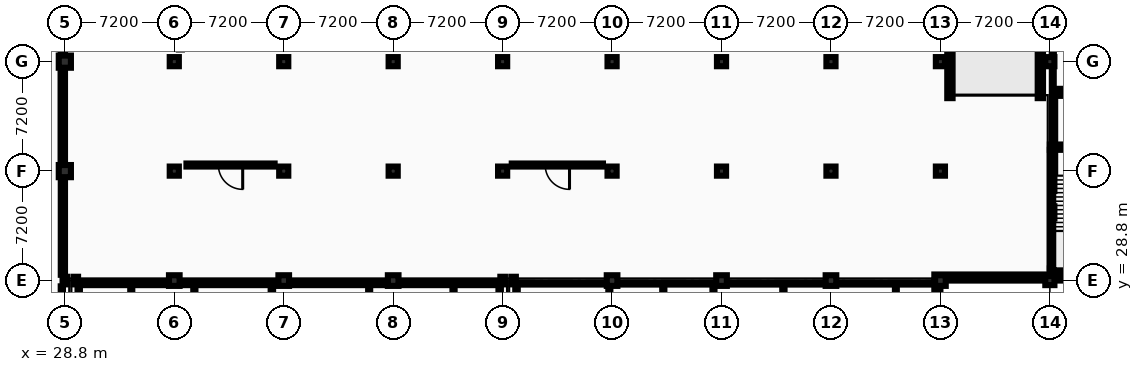
"""IFC4 building model, lengths in metres.
Left out: names, types, materials, properties, quantities, classifications, styles, units other than length and angle.
Written with IfcOpenShell. Run it as: python <this file> out.ifc"""

import sys

from ifc_helpers import new_model, si_unit, direction, frame, frame_2d, origin, origin_2d, place, context, subcontext, project, spatial, rectangle, i_section, extrude, element, fill, save


model = new_model("IFC4")
c1 = context("Model", 3, precision=1e-05, world=origin(), true_north=direction((0.0, 1.0)))
c2 = subcontext(c1, "Body", "Model", "MODEL_VIEW")
j1 = project(units=[si_unit("LENGTHUNIT", "METRE"), si_unit("PLANEANGLEUNIT", "RADIAN")], contexts=[c1])
p1 = place(None, origin())
s1 = spatial("IfcSite", under=j1, at=p1, CompositionType="ELEMENT")
p2 = place(p1, origin())
s2 = spatial("IfcBuilding", under=s1, at=p2, CompositionType="ELEMENT")
p3 = place(p2, frame((0.0, 0.0, -4.8)))
s3 = spatial("IfcBuildingStorey", under=s2, at=p3, CompositionType="ELEMENT", Elevation=-4.8)
p4 = place(p3, frame((28.8, 28.8, 0.0), z_axis=(0.0, 0.0, 1.0), x_axis=(1.0, 0.0, 0.0)))
e1 = element("IfcColumn", 1, at=p4, inside=s3, PredefinedType="COLUMN", context=c2, shape_type="SweptSolid", body=[
    extrude(i_section(OverallWidth=0.3, OverallDepth=0.5, WebThickness=0.014, FlangeThickness=0.028, FilletRadius=0.027, at=origin_2d()), origin(), (0.0, 0.0, 1.0), 4.8),
])
for number, where, z_axis, x_axis in (
    (2, (28.8, 36.0, 0.0), (0.0, 0.0, 1.0), (1.0, 0.0, 0.0)),
    (3, (28.8, 43.2, 0.0), (0.0, 0.0, 1.0), (1.0, 0.0, 0.0)),
):
    element("IfcColumn", number, at=place(p3, frame(where, z_axis=z_axis, x_axis=x_axis)), inside=s3, PredefinedType="COLUMN", context=c2, shape_type="SweptSolid", body=[
        extrude(rectangle(XDim=0.8, YDim=0.8, at=origin_2d()), origin(), (0.0, 0.0, 1.0), 4.8),
    ])
p5 = place(p3, frame((29.52, 28.8, 0.0), z_axis=(0.0, 0.0, 1.0), x_axis=(1.0, 0.0, 0.0)))
e4 = element("IfcColumn", 4, at=p5, inside=s3, PredefinedType="COLUMN", context=c2, shape_type="SweptSolid", body=[
    extrude(i_section(OverallWidth=0.3, OverallDepth=0.5, WebThickness=0.014, FlangeThickness=0.028, FilletRadius=0.027, at=origin_2d()), origin(), (0.0, 0.0, 1.0), 4.8),
])
p6 = place(p3, frame((36.0, 28.8, 0.0), z_axis=(0.0, 0.0, 1.0), x_axis=(1.0, 0.0, 0.0)))
e5 = element("IfcColumn", 5, at=p6, inside=s3, PredefinedType="COLUMN", context=c2, shape_type="SweptSolid", body=[
    extrude(rectangle(XDim=0.7, YDim=0.7, at=origin_2d()), origin(), (0.0, 0.0, 1.0), 4.8),
])
for number, where, z_axis, x_axis in (
    (6, (36.0, 36.0, 0.0), (0.0, 0.0, 1.0), (1.0, 0.0, 0.0)),
    (7, (36.0, 43.2, 0.0), (0.0, 0.0, 1.0), (1.0, 0.0, 0.0)),
):
    element("IfcColumn", number, at=place(p3, frame(where, z_axis=z_axis, x_axis=x_axis)), inside=s3, PredefinedType="COLUMN", context=c2, shape_type="SweptSolid", body=[
        extrude(rectangle(XDim=0.6, YDim=0.6, at=origin_2d()), origin(), (0.0, 0.0, 1.0), 4.8),
    ])
p7 = place(p3, frame((43.2, 28.8, 0.0), z_axis=(0.0, 0.0, 1.0), x_axis=(1.0, 0.0, 0.0)))
e8 = element("IfcColumn", 8, at=p7, inside=s3, PredefinedType="COLUMN", context=c2, shape_type="SweptSolid", body=[
    extrude(rectangle(XDim=0.7, YDim=0.7, at=origin_2d()), origin(), (0.0, 0.0, 1.0), 4.8),
])
for number, where, z_axis, x_axis in (
    (9, (43.2, 36.0, 0.0), (0.0, 0.0, 1.0), (1.0, 0.0, 0.0)),
    (10, (43.2, 43.2, 0.0), (0.0, 0.0, 1.0), (1.0, 0.0, 0.0)),
):
    element("IfcColumn", number, at=place(p3, frame(where, z_axis=z_axis, x_axis=x_axis)), inside=s3, PredefinedType="COLUMN", context=c2, shape_type="SweptSolid", body=[
        extrude(rectangle(XDim=0.6, YDim=0.6, at=origin_2d()), origin(), (0.0, 0.0, 1.0), 4.8),
    ])
p8 = place(p3, frame((50.4, 28.8, 0.0), z_axis=(0.0, 0.0, 1.0), x_axis=(1.0, 0.0, 0.0)))
e11 = element("IfcColumn", 11, at=p8, inside=s3, PredefinedType="COLUMN", context=c2, shape_type="SweptSolid", body=[
    extrude(rectangle(XDim=0.7, YDim=0.7, at=origin_2d()), origin(), (0.0, 0.0, 1.0), 4.8),
])
for number, where, z_axis, x_axis in (
    (12, (50.4, 36.0, 0.0), (0.0, 0.0, 1.0), (1.0, 0.0, 0.0)),
    (13, (50.4, 43.2, 0.0), (0.0, 0.0, 1.0), (1.0, 0.0, 0.0)),
):
    element("IfcColumn", number, at=place(p3, frame(where, z_axis=z_axis, x_axis=x_axis)), inside=s3, PredefinedType="COLUMN", context=c2, shape_type="SweptSolid", body=[
        extrude(rectangle(XDim=0.6, YDim=0.6, at=origin_2d()), origin(), (0.0, 0.0, 1.0), 4.8),
    ])
p9 = place(p3, frame((57.6, 28.8, 0.0), z_axis=(0.0, 0.0, 1.0), x_axis=(1.0, 0.0, 0.0)))
e14 = element("IfcColumn", 14, at=p9, inside=s3, PredefinedType="COLUMN", context=c2, shape_type="SweptSolid", body=[
    extrude(i_section(OverallWidth=0.3, OverallDepth=0.5, WebThickness=0.014, FlangeThickness=0.028, FilletRadius=0.027, at=origin_2d()), origin(), (0.0, 0.0, 1.0), 4.8),
])
for number, where, z_axis, x_axis in (
    (15, (57.6, 36.0, 0.0), (0.0, 0.0, 1.0), (1.0, 0.0, 0.0)),
    (16, (57.6, 43.2, 0.0), (0.0, 0.0, 1.0), (1.0, 0.0, 0.0)),
):
    element("IfcColumn", number, at=place(p3, frame(where, z_axis=z_axis, x_axis=x_axis)), inside=s3, PredefinedType="COLUMN", context=c2, shape_type="SweptSolid", body=[
        extrude(rectangle(XDim=0.6, YDim=0.6, at=origin_2d()), origin(), (0.0, 0.0, 1.0), 4.8),
    ])
p10 = place(p3, frame((58.32, 28.8, 0.0), z_axis=(0.0, 0.0, 1.0), x_axis=(1.0, 0.0, 0.0)))
e17 = element("IfcColumn", 17, at=p10, inside=s3, PredefinedType="COLUMN", context=c2, shape_type="SweptSolid", body=[
    extrude(i_section(OverallWidth=0.3, OverallDepth=0.5, WebThickness=0.014, FlangeThickness=0.028, FilletRadius=0.027, at=origin_2d()), origin(), (0.0, 0.0, 1.0), 4.8),
])
p11 = place(p3, frame((64.8, 28.8, 0.0), z_axis=(0.0, 0.0, 1.0), x_axis=(1.0, 0.0, 0.0)))
e18 = element("IfcColumn", 18, at=p11, inside=s3, PredefinedType="COLUMN", context=c2, shape_type="SweptSolid", body=[
    extrude(rectangle(XDim=0.7, YDim=0.7, at=origin_2d()), origin(), (0.0, 0.0, 1.0), 4.8),
])
for number, where, z_axis, x_axis in (
    (19, (64.8, 36.0, 0.0), (0.0, 0.0, 1.0), (1.0, 0.0, 0.0)),
    (20, (64.8, 43.2, 0.0), (0.0, 0.0, 1.0), (1.0, 0.0, 0.0)),
):
    element("IfcColumn", number, at=place(p3, frame(where, z_axis=z_axis, x_axis=x_axis)), inside=s3, PredefinedType="COLUMN", context=c2, shape_type="SweptSolid", body=[
        extrude(rectangle(XDim=0.6, YDim=0.6, at=origin_2d()), origin(), (0.0, 0.0, 1.0), 4.8),
    ])
p12 = place(p3, frame((72.0, 28.8, 0.0), z_axis=(0.0, 0.0, 1.0), x_axis=(1.0, 0.0, 0.0)))
e21 = element("IfcColumn", 21, at=p12, inside=s3, PredefinedType="COLUMN", context=c2, shape_type="SweptSolid", body=[
    extrude(rectangle(XDim=0.7, YDim=0.7, at=origin_2d()), origin(), (0.0, 0.0, 1.0), 4.8),
])
for number, where, z_axis, x_axis in (
    (22, (72.0, 36.0, 0.0), (0.0, 0.0, 1.0), (1.0, 0.0, 0.0)),
    (23, (72.0, 43.2, 0.0), (0.0, 0.0, 1.0), (1.0, 0.0, 0.0)),
):
    element("IfcColumn", number, at=place(p3, frame(where, z_axis=z_axis, x_axis=x_axis)), inside=s3, PredefinedType="COLUMN", context=c2, shape_type="SweptSolid", body=[
        extrude(rectangle(XDim=0.6, YDim=0.6, at=origin_2d()), origin(), (0.0, 0.0, 1.0), 4.8),
    ])
p13 = place(p3, frame((79.2, 28.8, 0.0), z_axis=(0.0, 0.0, 1.0), x_axis=(1.0, 0.0, 0.0)))
e24 = element("IfcColumn", 24, at=p13, inside=s3, PredefinedType="COLUMN", context=c2, shape_type="SweptSolid", body=[
    extrude(rectangle(XDim=0.7, YDim=0.7, at=origin_2d()), origin(), (0.0, 0.0, 1.0), 4.8),
])
for number, where, z_axis, x_axis in (
    (25, (79.2, 36.0, 0.0), (0.0, 0.0, 1.0), (1.0, 0.0, 0.0)),
    (26, (79.2, 43.2, 0.0), (0.0, 0.0, 1.0), (1.0, 0.0, 0.0)),
):
    element("IfcColumn", number, at=place(p3, frame(where, z_axis=z_axis, x_axis=x_axis)), inside=s3, PredefinedType="COLUMN", context=c2, shape_type="SweptSolid", body=[
        extrude(rectangle(XDim=0.6, YDim=0.6, at=origin_2d()), origin(), (0.0, 0.0, 1.0), 4.8),
    ])
p14 = place(p3, frame((86.4, 28.8, 0.0), z_axis=(0.0, 0.0, 1.0), x_axis=(1.0, 0.0, 0.0)))
e27 = element("IfcColumn", 27, at=p14, inside=s3, PredefinedType="COLUMN", context=c2, shape_type="SweptSolid", body=[
    extrude(rectangle(XDim=0.7, YDim=0.7, at=origin_2d()), origin(), (0.0, 0.0, 1.0), 4.8),
])
for number, where, z_axis, x_axis in (
    (28, (86.4, 36.0, 0.0), (0.0, 0.0, 1.0), (1.0, 0.0, 0.0)),
    (29, (86.4, 43.2, 0.0), (0.0, 0.0, 1.0), (1.0, 0.0, 0.0)),
    (30, (93.6, 28.8, 0.0), (0.0, 0.0, 1.0), (1.0, 0.0, 0.0)),
    (31, (93.6, 43.2, 0.0), (0.0, 0.0, 1.0), (1.0, 0.0, 0.0)),
):
    element("IfcColumn", number, at=place(p3, frame(where, z_axis=z_axis, x_axis=x_axis)), inside=s3, PredefinedType="COLUMN", context=c2, shape_type="SweptSolid", body=[
        extrude(rectangle(XDim=0.6, YDim=0.6, at=origin_2d()), origin(), (0.0, 0.0, 1.0), 4.8),
    ])
p15 = place(p3, frame((86.2, 0.4, 0.0), z_axis=(0.0, 0.0, 1.0), x_axis=(0.0, 1.0, 0.0)))
e32 = element("IfcWall", 32, at=p15, inside=s3, PredefinedType="USERDEFINED", context=c2, shape_type="SweptSolid", body=[
    extrude(rectangle(XDim=28.4, YDim=0.4, at=frame_2d((14.2, 0.0))), origin(), (0.0, 0.0, 1.0), 4.545),
])
p16 = place(p3, frame((86.0, 29.0, 0.0), z_axis=(0.0, 0.0, 1.0), x_axis=(1.0, 0.0, 0.0)))
e33 = element("IfcWall", 33, at=p16, inside=s3, PredefinedType="USERDEFINED", context=c2, shape_type="SweptSolid", body=[
    extrude(rectangle(XDim=36.4, YDim=0.4, at=frame_2d((18.2, 0.0))), origin(), (0.0, 0.0, 1.0), 4.545),
])
for number, where, z_axis, x_axis in (
    (34, (87.025, 40.8, 0.0), (0.0, 0.0, 1.0), (0.0, 1.0, 0.0)),
    (35, (92.975, 40.8, 0.0), (0.0, 0.0, 1.0), (0.0, 1.0, 0.0)),
):
    element("IfcWall", number, at=place(p3, frame(where, z_axis=z_axis, x_axis=x_axis)), inside=s3, PredefinedType="USERDEFINED", context=c2, shape_type="SweptSolid", body=[
        extrude(rectangle(XDim=11.2, YDim=0.35, at=frame_2d((5.6, 0.0))), origin(), (0.0, 0.0, 1.0), 4.58),
    ])
p17 = place(p3, frame((93.6, 29.425, 0.0), z_axis=(0.0, 0.0, 1.0), x_axis=(1.0, 0.0, 0.0)))
e36 = element("IfcWall", 36, at=p17, inside=s3, PredefinedType="SHEAR", context=c2, shape_type="SweptSolid", body=[
    extrude(rectangle(XDim=3.85, YDim=0.35, at=frame_2d((1.925, 0.0))), origin(), (0.0, 0.0, 1.0), 4.545),
])
p18 = place(p3, frame((93.6, 37.575, 0.0), z_axis=(0.0, 0.0, 1.0), x_axis=(1.0, 0.0, 0.0)))
e37 = element("IfcWall", 37, at=p18, inside=s3, PredefinedType="SHEAR", context=c2, shape_type="SweptSolid", body=[
    extrude(rectangle(XDim=3.85, YDim=0.35, at=frame_2d((1.925, 0.0))), origin(), (0.0, 0.0, 1.0), 4.545),
])
p19 = place(p18, frame((1.375, 0.0, 0.0)))
e38 = element("IfcOpeningElement", 38, at=p19, cuts=e37, PredefinedType="OPENING", context=c2, shape_type="SweptSolid", body=[
    extrude(rectangle(XDim=1.1, YDim=2.15, at=frame_2d((0.55, 1.075))), frame((0.0, 0.185, 0.0), z_axis=(0.0, -1.0, 0.0), x_axis=(1.0, 0.0, 0.0)), (0.0, 0.0, 1.0), 0.37),
])
p20 = place(p3, frame((93.775, 29.6, 0.0), z_axis=(0.0, 0.0, 1.0), x_axis=(0.0, 1.0, 0.0)))
e39 = element("IfcWall", 39, at=p20, inside=s3, PredefinedType="SHEAR", context=c2, shape_type="SweptSolid", body=[
    extrude(rectangle(XDim=7.8, YDim=0.35, at=frame_2d((3.9, 0.0))), origin(), (0.0, 0.0, 1.0), 4.545),
])
p21 = place(p3, frame((93.95, 41.05, 0.0), z_axis=(0.0, 0.0, 1.0), x_axis=(1.0, 0.0, 0.0)))
e40 = element("IfcWall", 40, at=p21, inside=s3, PredefinedType="PARTITIONING", context=c2, shape_type="SweptSolid", body=[
    extrude(rectangle(XDim=5.75, YDim=0.2, at=frame_2d((2.875, 0.0))), origin(), (0.0, 0.0, 1.0), 4.545),
])
p22 = place(p3, frame((93.85, 37.75, 0.0), z_axis=(0.0, 0.0, 1.0), x_axis=(0.0, 1.0, 0.0)))
e41 = element("IfcWall", 41, at=p22, inside=s3, PredefinedType="PARTITIONING", context=c2, shape_type="SweptSolid", body=[
    extrude(rectangle(XDim=3.4, YDim=0.2, at=frame_2d((1.7, 0.0))), origin(), (0.0, 0.0, 1.0), 4.545),
])
p23 = place(p3, frame((29.9, 28.6, 0.0), z_axis=(0.0, 0.0, 1.0), x_axis=(1.0, 0.0, 0.0)))
e42 = element("IfcWall", 42, at=p23, inside=s3, PredefinedType="PARTITIONING", context=c2, shape_type="SweptSolid", body=[
    extrude(rectangle(XDim=5.72, YDim=0.2, at=frame_2d((2.86, 0.0))), origin(), (0.0, 0.0, 1.0), 4.095),
])
p24 = place(p3, frame((36.38, 28.6, 0.0), z_axis=(0.0, 0.0, 1.0), x_axis=(1.0, 0.0, 0.0)))
e43 = element("IfcWall", 43, at=p24, inside=s3, PredefinedType="PARTITIONING", context=c2, shape_type="SweptSolid", body=[
    extrude(rectangle(XDim=6.44, YDim=0.2, at=frame_2d((3.22, 0.0))), origin(), (0.0, 0.0, 1.0), 4.095),
])
for number, where, z_axis, x_axis in (
    (44, (43.58, 28.6, 0.0), (0.0, 0.0, 1.0), (1.0, 0.0, 0.0)),
    (45, (50.78, 28.6, 0.0), (0.0, 0.0, 1.0), (1.0, 0.0, 0.0)),
):
    element("IfcWall", number, at=place(p3, frame(where, z_axis=z_axis, x_axis=x_axis)), inside=s3, PredefinedType="PARTITIONING", context=c2, shape_type="SweptSolid", body=[
        extrude(rectangle(XDim=6.44, YDim=0.2, at=frame_2d((3.22, 0.0))), origin(), (0.0, 0.0, 1.0), 4.095),
    ])
p25 = place(p3, frame((58.7, 28.6, 0.0), z_axis=(0.0, 0.0, 1.0), x_axis=(1.0, 0.0, 0.0)))
e46 = element("IfcWall", 46, at=p25, inside=s3, PredefinedType="PARTITIONING", context=c2, shape_type="SweptSolid", body=[
    extrude(rectangle(XDim=5.72, YDim=0.125, at=frame_2d((2.86, 0.0))), origin(), (0.0, 0.0, 1.0), 4.095),
])
for number, where, z_axis, x_axis in (
    (47, (65.18, 28.6, 0.0), (0.0, 0.0, 1.0), (1.0, 0.0, 0.0)),
    (48, (72.38, 28.6, 0.0), (0.0, 0.0, 1.0), (1.0, 0.0, 0.0)),
):
    element("IfcWall", number, at=place(p3, frame(where, z_axis=z_axis, x_axis=x_axis)), inside=s3, PredefinedType="PARTITIONING", context=c2, shape_type="SweptSolid", body=[
        extrude(rectangle(XDim=6.44, YDim=0.125, at=frame_2d((3.22, 0.0))), origin(), (0.0, 0.0, 1.0), 4.095),
    ])
p26 = place(p3, frame((79.58, 28.6, 0.0), z_axis=(0.0, 0.0, 1.0), x_axis=(1.0, 0.0, 0.0)))
e49 = element("IfcWall", 49, at=p26, inside=s3, PredefinedType="PARTITIONING", context=c2, shape_type="SweptSolid", body=[
    extrude(rectangle(XDim=6.4, YDim=0.125, at=frame_2d((3.2, 0.0))), origin(), (0.0, 0.0, 1.0), 4.095),
])
p27 = place(p3, frame((93.97, 41.35, 0.0), z_axis=(0.0, 0.0, 1.0), x_axis=(1.0, 0.0, 0.0)))
e50 = element("IfcWall", 50, at=p27, inside=s3, PredefinedType="PARTITIONING", context=c2, shape_type="SweptSolid", body=[
    extrude(rectangle(XDim=5.71, YDim=0.125, at=frame_2d((2.855, 0.0))), origin(), (0.0, 0.0, 1.0), 4.545),
])
p28 = place(p3, frame((28.6, 21.98, 0.0), z_axis=(0.0, 0.0, 1.0), x_axis=(0.0, 1.0, 0.0)))
e51 = element("IfcWall", 51, at=p28, inside=s3, PredefinedType="PARTITIONING", context=c2, shape_type="SweptSolid", body=[
    extrude(rectangle(XDim=6.44, YDim=0.142, at=frame_2d((3.22, 0.0))), origin(), (0.0, 0.0, 1.0), 4.245),
])
p29 = place(p3, frame((28.6, 29.18, 0.0), z_axis=(0.0, 0.0, 1.0), x_axis=(0.0, 1.0, 0.0)))
e52 = element("IfcWall", 52, at=p29, inside=s3, PredefinedType="PARTITIONING", context=c2, shape_type="SweptSolid", body=[
    extrude(rectangle(XDim=6.44, YDim=0.135, at=frame_2d((3.22, 0.0))), origin(), (0.0, 0.0, 1.0), 4.245),
])
p30 = place(p3, frame((28.6, 36.38, 0.0), z_axis=(0.0, 0.0, 1.0), x_axis=(0.0, 1.0, 0.0)))
e53 = element("IfcWall", 53, at=p30, inside=s3, PredefinedType="PARTITIONING", context=c2, shape_type="SweptSolid", body=[
    extrude(rectangle(XDim=6.44, YDim=0.16, at=frame_2d((3.22, 0.0))), origin(), (0.0, 0.0, 1.0), 4.245),
])
p31 = place(p3, frame((28.6, 43.58, 0.0), z_axis=(0.0, 0.0, 1.0), x_axis=(0.0, 1.0, 0.0)))
e54 = element("IfcWall", 54, at=p31, inside=s3, PredefinedType="PARTITIONING", context=c2, shape_type="SweptSolid", body=[
    extrude(rectangle(XDim=6.44, YDim=0.15, at=frame_2d((3.22, 0.0))), origin(), (0.0, 0.0, 1.0), 4.245),
])
p32 = place(p3, frame((29.72, 21.98, 0.0), z_axis=(0.0, 0.0, 1.0), x_axis=(0.0, 1.0, 0.0)))
e55 = element("IfcWall", 55, at=p32, inside=s3, PredefinedType="PARTITIONING", context=c2, shape_type="SweptSolid", body=[
    extrude(rectangle(XDim=6.44, YDim=0.142, at=frame_2d((3.22, 0.0))), origin(), (0.0, 0.0, 1.0), 4.245),
])
p33 = place(p3, frame((33.17, 14.45, 0.0), z_axis=(0.0, 0.0, 1.0), x_axis=(0.0, 1.0, 0.0)))
e56 = element("IfcWall", 56, at=p33, inside=s3, PredefinedType="PARTITIONING", context=c2, shape_type="SweptSolid", body=[
    extrude(rectangle(XDim=14.05, YDim=0.135, at=frame_2d((7.025, 0.0))), origin(), (0.0, 0.0, 1.0), 4.545),
])
p34 = place(p3, frame((37.32, 14.45, 0.0), z_axis=(0.0, 0.0, 1.0), x_axis=(0.0, 1.0, 0.0)))
e57 = element("IfcWall", 57, at=p34, inside=s3, PredefinedType="PARTITIONING", context=c2, shape_type="SweptSolid", body=[
    extrude(rectangle(XDim=14.05, YDim=0.142, at=frame_2d((7.025, 0.0))), origin(), (0.0, 0.0, 1.0), 4.545),
])
p35 = place(p3, frame((42.42, 14.45, 0.0), z_axis=(0.0, 0.0, 1.0), x_axis=(0.0, 1.0, 0.0)))
e58 = element("IfcWall", 58, at=p35, inside=s3, PredefinedType="PARTITIONING", context=c2, shape_type="SweptSolid", body=[
    extrude(rectangle(XDim=14.05, YDim=0.16, at=frame_2d((7.025, 0.0))), origin(), (0.0, 0.0, 1.0), 4.545),
])
p36 = place(p3, frame((48.82, 14.45, 0.0), z_axis=(0.0, 0.0, 1.0), x_axis=(0.0, 1.0, 0.0)))
e59 = element("IfcWall", 59, at=p36, inside=s3, PredefinedType="PARTITIONING", context=c2, shape_type="SweptSolid", body=[
    extrude(rectangle(XDim=14.05, YDim=0.135, at=frame_2d((7.025, 0.0))), origin(), (0.0, 0.0, 1.0), 4.545),
])
p37 = place(p3, frame((54.37, 14.45, 0.0), z_axis=(0.0, 0.0, 1.0), x_axis=(0.0, 1.0, 0.0)))
e60 = element("IfcWall", 60, at=p37, inside=s3, PredefinedType="PARTITIONING", context=c2, shape_type="SweptSolid", body=[
    extrude(rectangle(XDim=14.05, YDim=0.142, at=frame_2d((7.025, 0.0))), origin(), (0.0, 0.0, 1.0), 4.545),
])
for number, where, z_axis, x_axis in (
    (61, (57.4, 21.98, 0.0), (0.0, 0.0, 1.0), (0.0, 1.0, 0.0)),
    (62, (58.52, 21.98, 0.0), (0.0, 0.0, 1.0), (0.0, 1.0, 0.0)),
):
    element("IfcWall", number, at=place(p3, frame(where, z_axis=z_axis, x_axis=x_axis)), inside=s3, PredefinedType="PARTITIONING", context=c2, shape_type="SweptSolid", body=[
        extrude(rectangle(XDim=6.44, YDim=0.15, at=frame_2d((3.22, 0.0))), origin(), (0.0, 0.0, 1.0), 4.245),
    ])
p38 = place(p3, frame((64.62, 21.98, 0.0), z_axis=(0.0, 0.0, 1.0), x_axis=(0.0, 1.0, 0.0)))
e63 = element("IfcWall", 63, at=p38, inside=s3, PredefinedType="PARTITIONING", context=c2, shape_type="SweptSolid", body=[
    extrude(rectangle(XDim=6.44, YDim=0.135, at=frame_2d((3.22, 0.0))), origin(), (0.0, 0.0, 1.0), 4.245),
])
p39 = place(p3, frame((68.17, 14.413, 0.0), z_axis=(0.0, 0.0, 1.0), x_axis=(0.0, 1.0, 0.0)))
e64 = element("IfcWall", 64, at=p39, inside=s3, PredefinedType="PARTITIONING", context=c2, shape_type="SweptSolid", body=[
    extrude(rectangle(XDim=14.125, YDim=0.142, at=frame_2d((7.062, 0.0))), origin(), (0.0, 0.0, 1.0), 4.545),
])
p40 = place(p3, frame((71.47, 14.413, 0.0), z_axis=(0.0, 0.0, 1.0), x_axis=(0.0, 1.0, 0.0)))
e65 = element("IfcWall", 65, at=p40, inside=s3, PredefinedType="PARTITIONING", context=c2, shape_type="SweptSolid", body=[
    extrude(rectangle(XDim=14.125, YDim=0.135, at=frame_2d((7.062, 0.0))), origin(), (0.0, 0.0, 1.0), 4.545),
])
p41 = place(p3, frame((76.07, 14.413, 0.0), z_axis=(0.0, 0.0, 1.0), x_axis=(0.0, 1.0, 0.0)))
e66 = element("IfcWall", 66, at=p41, inside=s3, PredefinedType="PARTITIONING", context=c2, shape_type="SweptSolid", body=[
    extrude(rectangle(XDim=14.125, YDim=0.15, at=frame_2d((7.062, 0.0))), origin(), (0.0, 0.0, 1.0), 4.545),
])
p42 = place(p3, frame((83.47, 14.413, 0.0), z_axis=(0.0, 0.0, 1.0), x_axis=(0.0, 1.0, 0.0)))
e67 = element("IfcWall", 67, at=p42, inside=s3, PredefinedType="PARTITIONING", context=c2, shape_type="SweptSolid", body=[
    extrude(rectangle(XDim=14.125, YDim=0.125, at=frame_2d((7.062, 0.0))), origin(), (0.0, 0.0, 1.0), 4.545),
])
p43 = place(p3, frame((93.8, 41.35, 0.0), z_axis=(0.0, 0.0, 1.0), x_axis=(0.0, 1.0, 0.0)))
e68 = element("IfcWall", 68, at=p43, inside=s3, PredefinedType="PARTITIONING", context=c2, shape_type="SweptSolid", body=[
    extrude(rectangle(XDim=1.47, YDim=0.11, at=frame_2d((0.735, 0.0))), origin(), (0.0, 0.0, 1.0), 4.545),
])
p44 = place(p3, frame((93.8, 43.58, 0.0), z_axis=(0.0, 0.0, 1.0), x_axis=(0.0, 1.0, 0.0)))
e69 = element("IfcWall", 69, at=p44, inside=s3, PredefinedType="PARTITIONING", context=c2, shape_type="SweptSolid", body=[
    extrude(rectangle(XDim=1.37, YDim=0.125, at=frame_2d((0.685, 0.0))), origin(), (0.0, 0.0, 1.0), 4.545),
])
p45 = place(p3, frame((36.8, 36.4, 0.0), z_axis=(0.0, 0.0, 1.0), x_axis=(1.0, 0.0, 0.0)))
e70 = element("IfcWall", 70, at=p45, inside=s3, PredefinedType="PARTITIONING", context=c2, shape_type="SweptSolid", body=[
    extrude(rectangle(XDim=5.8, YDim=0.2, at=frame_2d((2.9, 0.0))), origin(), (0.0, 0.0, 1.0), 4.45),
])
p46 = place(p45, frame((2.1, 0.0, 0.0)))
e71 = element("IfcOpeningElement", 71, at=p46, cuts=e70, PredefinedType="OPENING", context=c2, shape_type="SweptSolid", body=[
    extrude(rectangle(XDim=1.6, YDim=2.2, at=frame_2d((0.8, 1.1))), frame((0.0, 0.11, 0.0), z_axis=(0.0, -1.0, 0.0), x_axis=(1.0, 0.0, 0.0)), (0.0, 0.0, 1.0), 0.22),
])
p47 = place(p3, frame((58.2, 36.4, 0.0), z_axis=(0.0, 0.0, 1.0), x_axis=(1.0, 0.0, 0.0)))
e72 = element("IfcWall", 72, at=p47, inside=s3, PredefinedType="PARTITIONING", context=c2, shape_type="SweptSolid", body=[
    extrude(rectangle(XDim=6.0, YDim=0.2, at=frame_2d((3.0, 0.0))), origin(), (0.0, 0.0, 1.0), 4.45),
])
p48 = place(p47, frame((2.2, 0.0, 0.0)))
e73 = element("IfcOpeningElement", 73, at=p48, cuts=e72, PredefinedType="OPENING", context=c2, shape_type="SweptSolid", body=[
    extrude(rectangle(XDim=1.6, YDim=2.2, at=frame_2d((0.8, 1.1))), frame((0.0, 0.11, 0.0), z_axis=(0.0, -1.0, 0.0), x_axis=(1.0, 0.0, 0.0)), (0.0, 0.0, 1.0), 0.22),
])
p49 = place(p46, origin())
e74 = element("IfcDoor", 74, at=p49, inside=s3, OperationType="DOUBLE_DOOR_SINGLE_SWING", PredefinedType="DOOR", context=c2, shape_type="SweptSolid", body=[
    extrude(rectangle(XDim=1.6, YDim=2.2, at=frame_2d((0.8, 1.1))), frame((0.0, 0.025, 0.0), z_axis=(0.0, -1.0, 0.0), x_axis=(1.0, 0.0, 0.0)), (0.0, 0.0, 1.0), 0.05),
])
fill(e71, e74)
p50 = place(p48, origin())
e75 = element("IfcDoor", 75, at=p50, inside=s3, OperationType="DOUBLE_DOOR_SINGLE_SWING", PredefinedType="DOOR", context=c2, shape_type="SweptSolid", body=[
    extrude(rectangle(XDim=1.6, YDim=2.2, at=frame_2d((0.8, 1.1))), frame((0.0, 0.025, 0.0), z_axis=(0.0, -1.0, 0.0), x_axis=(1.0, 0.0, 0.0)), (0.0, 0.0, 1.0), 0.05),
])
fill(e73, e75)
save(model, sys.argv[1])
